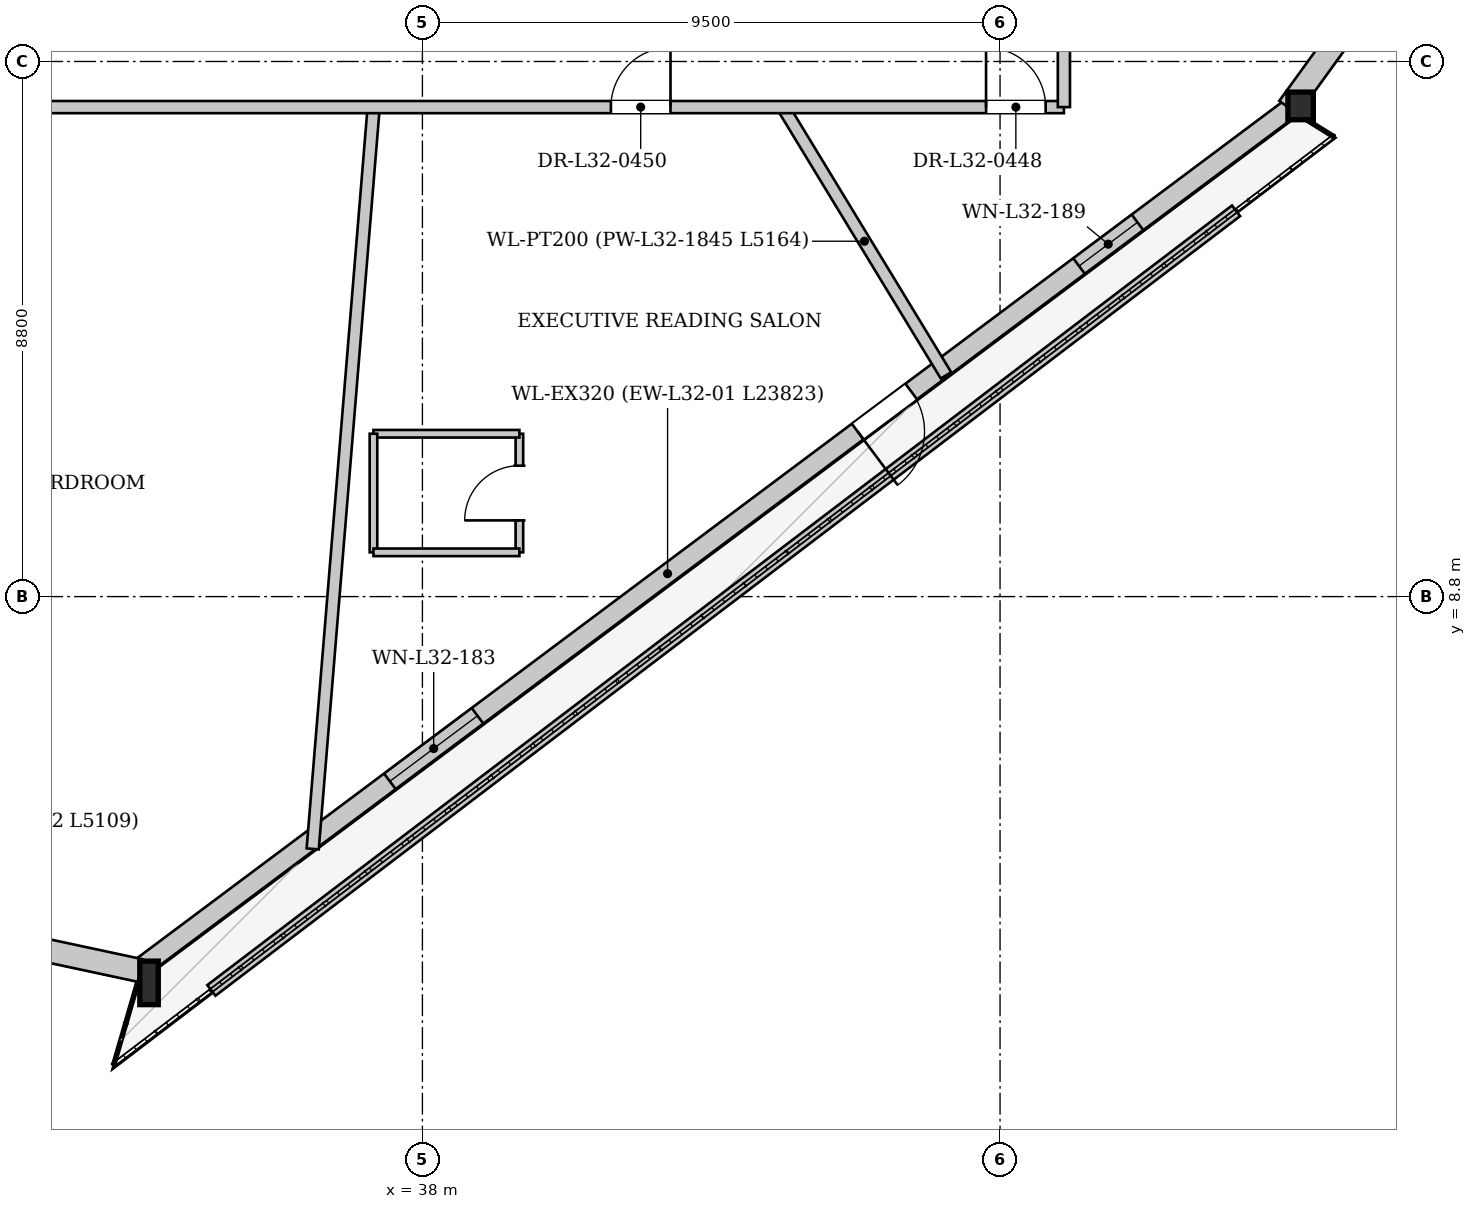
"""IFC4 building model, lengths in metres.
Left out: names, types, materials, properties, quantities, classifications, styles, units other than length and angle.
Written with IfcOpenShell. Run it as: python <this file> out.ifc"""

import sys

from ifc_helpers import new_model, si_unit, direction, frame, frame_2d, origin, origin_2d, place, context, subcontext, project, spatial, rectangle, i_section, extrude, source, transform, mapped, element, fill, save


model = new_model("IFC4")
c1 = context("Model", 3, precision=1e-05, world=origin(), true_north=direction((0.0, 1.0)))
c2 = subcontext(c1, "Body", "Model", "MODEL_VIEW")
j1 = project(units=[si_unit("LENGTHUNIT", "METRE"), si_unit("PLANEANGLEUNIT", "RADIAN")], contexts=[c1])
p1 = place(None, origin())
s1 = spatial("IfcSite", under=j1, at=p1, CompositionType="ELEMENT")
p2 = place(p1, origin())
s2 = spatial("IfcBuilding", under=s1, at=p2, CompositionType="ELEMENT")
p3 = place(p2, frame((0.0, 0.0, 123.45)))
s3 = spatial("IfcBuildingStorey", under=s2, at=p3, CompositionType="ELEMENT", Elevation=123.45)
m1 = source(origin(), c2, "Body", "SweptSolid", [
    extrude(i_section(OverallWidth=0.304, OverallDepth=0.716, WebThickness=0.021, FlangeThickness=0.04, at=origin_2d()), origin(), (0.0, 0.0, 1.0), 3.405),
])
p4 = place(p3, frame((33.321, 2.464, 0.0), z_axis=(0.107623996399, -0.009966512658, 0.994141712245), x_axis=(0.092210391017, 0.995739546161, 0.0)))
e1 = element("IfcColumn", 1, at=p4, inside=s3, PredefinedType="COLUMN", context=c2, shape_type="MappedRepresentation", body=[
    mapped(m1, transform((0.0, 0.0, 0.0), x_axis=(1.0, 0.0, 0.0), y_axis=(0.0, 1.0, 0.0), z_axis=(0.0, 0.0, 1.0), scale=1.0)),
])
m2 = source(origin(), c2, "Body", "SweptSolid", [
    extrude(i_section(OverallWidth=0.418, OverallDepth=0.455, WebThickness=0.038, FlangeThickness=0.059, at=origin_2d()), origin(), (0.0, 0.0, 1.0), 3.398),
])
p5 = place(p3, frame((52.4, 16.729, 0.0), z_axis=(0.025364652364, 0.082560865627, 0.996263187053), x_axis=(-0.955904837119, 0.293676594868, 0.0)))
e2 = element("IfcColumn", 2, at=p5, inside=s3, PredefinedType="COLUMN", context=c2, shape_type="MappedRepresentation", body=[
    mapped(m2, transform((0.0, 0.0, 0.0), x_axis=(1.0, 0.0, 0.0), y_axis=(0.0, 1.0, 0.0), z_axis=(0.0, 0.0, 1.0), scale=1.0)),
])
p6 = place(p3, frame((52.305, 16.857, 0.0), z_axis=(0.0, 0.0, 1.0), x_axis=(-0.800901761672, -0.598795764974, 0.0)))
e3 = element("IfcWall", 3, at=p6, inside=s3, PredefinedType="SOLIDWALL", context=c2, shape_type="SweptSolid", body=[
    extrude(rectangle(XDim=23.823, YDim=0.32, at=frame_2d((11.911, 0.0))), origin(), (0.0, 0.0, 1.0), 2.692),
])
p7 = place(p6, frame((7.823, 0.0, 0.0)))
e4 = element("IfcOpeningElement", 4, at=p7, cuts=e3, PredefinedType="OPENING", context=c2, shape_type="SweptSolid", body=[
    extrude(rectangle(XDim=1.1, YDim=2.3, at=frame_2d((0.55, 1.15))), frame((0.0, 0.17, 0.0), z_axis=(0.0, -1.0, 0.0), x_axis=(1.0, 0.0, 0.0)), (0.0, 0.0, 1.0), 0.34),
])
p8 = place(p6, frame((16.729, 0.0, 0.372)))
e5 = element("IfcOpeningElement", 5, at=p8, cuts=e3, PredefinedType="OPENING", context=c2, shape_type="SweptSolid", body=[
    extrude(rectangle(XDim=1.8, YDim=2.2, at=frame_2d((0.9, 1.1))), frame((0.0, 0.17, 0.0), z_axis=(0.0, -1.0, 0.0), x_axis=(1.0, 0.0, 0.0)), (0.0, 0.0, 1.0), 0.34),
])
p9 = place(p6, frame((3.177, 0.0, 0.65)))
e6 = element("IfcOpeningElement", 6, at=p9, cuts=e3, PredefinedType="OPENING", context=c2, shape_type="SweptSolid", body=[
    extrude(rectangle(XDim=1.2, YDim=1.5, at=frame_2d((0.6, 0.75))), frame((0.0, 0.17, 0.0), z_axis=(0.0, -1.0, 0.0), x_axis=(1.0, 0.0, 0.0)), (0.0, 0.0, 1.0), 0.34),
])
p10 = place(p3, frame((33.361, 2.65, 0.0), z_axis=(0.0, 0.0, 1.0), x_axis=(-0.977780031058, 0.209633515602, 0.0)))
e7 = element("IfcWall", 7, at=p10, inside=s3, PredefinedType="SOLIDWALL", context=c2, shape_type="SweptSolid", body=[
    extrude(rectangle(XDim=5.109, YDim=0.38, at=frame_2d((2.555, 0.0))), origin(), (0.0, 0.0, 1.0), 2.692),
])
p11 = place(p3, frame((66.21, 36.142, 0.0), z_axis=(0.0, 0.0, 1.0), x_axis=(-0.586152279149, -0.810200904497, 0.0)))
e8 = element("IfcWall", 8, at=p11, inside=s3, PredefinedType="SOLIDWALL", context=c2, shape_type="SweptSolid", body=[
    extrude(rectangle(XDim=23.823, YDim=0.38, at=frame_2d((11.911, 0.0))), origin(), (0.0, 0.0, 1.0), 2.692),
])
p12 = place(p11, frame((5.57, 0.0, 0.322)))
e9 = element("IfcOpeningElement", 9, at=p12, cuts=e8, PredefinedType="OPENING", context=c2, shape_type="SweptSolid", body=[
    extrude(rectangle(XDim=2.2, YDim=2.25, at=frame_2d((1.1, 1.125))), frame((0.0, 0.2, 0.0), z_axis=(0.0, -1.0, 0.0), x_axis=(1.0, 0.0, 0.0)), (0.0, 0.0, 1.0), 0.4),
])
p13 = place(p11, frame((14.452, 0.0, 0.322)))
e10 = element("IfcOpeningElement", 10, at=p13, cuts=e8, PredefinedType="OPENING", context=c2, shape_type="SweptSolid", body=[
    extrude(rectangle(XDim=2.2, YDim=2.25, at=frame_2d((1.1, 1.125))), frame((0.0, 0.2, 0.0), z_axis=(0.0, -1.0, 0.0), x_axis=(1.0, 0.0, 0.0)), (0.0, 0.0, 1.0), 0.4),
])
p14 = place(p3, frame((34.529, 2.323, 0.0), z_axis=(0.0, 0.0, 1.0), x_axis=(0.795860822031, 0.605479604905, 0.0)))
e11 = element("IfcWall", 11, at=p14, inside=s3, PredefinedType="PARAPET", context=c2, shape_type="SweptSolid", body=[
    extrude(rectangle(XDim=21.175, YDim=0.22, at=frame_2d((10.587, 0.0))), origin(), (0.0, 0.0, 1.0), 0.3),
])
p15 = place(p3, frame((43.928, 16.85, 0.0), z_axis=(0.0, 0.0, 1.0), x_axis=(0.519520898973, -0.85445774356, 0.0)))
e12 = element("IfcWall", 12, at=p15, inside=s3, PredefinedType="PARTITIONING", context=c2, shape_type="SweptSolid", body=[
    extrude(rectangle(XDim=5.164, YDim=0.2, at=frame_2d((2.582, 0.0))), origin(), (0.0, 0.0, 1.0), 3.3),
])
p16 = place(p3, frame((37.198, 16.85, 0.0), z_axis=(0.0, 0.0, 1.0), x_axis=(-0.08193618257, -0.996637578052, 0.0)))
e13 = element("IfcWall", 13, at=p16, inside=s3, PredefinedType="PARTITIONING", context=c2, shape_type="SweptSolid", body=[
    extrude(rectangle(XDim=12.24, YDim=0.2, at=frame_2d((6.12, 0.0))), origin(), (0.0, 0.0, 1.0), 3.3),
])
p17 = place(p3, frame((39.595, 9.528, 0.0), z_axis=(0.0, 0.0, 1.0), x_axis=(0.0, 1.0, 0.0)))
e14 = element("IfcWall", 14, at=p17, inside=s3, PredefinedType="PARTITIONING", context=c2, shape_type="SweptSolid", body=[
    extrude(rectangle(XDim=1.95, YDim=0.125, at=frame_2d((0.975, 0.0))), origin(), (0.0, 0.0, 1.0), 3.3),
])
p18 = place(p17, frame((0.525, 0.0, 0.0)))
e15 = element("IfcOpeningElement", 15, at=p18, cuts=e14, PredefinedType="OPENING", context=c2, shape_type="SweptSolid", body=[
    extrude(rectangle(XDim=0.9, YDim=2.1, at=frame_2d((0.45, 1.05))), frame((0.0, 0.073, 0.0), z_axis=(0.0, -1.0, 0.0), x_axis=(1.0, 0.0, 0.0)), (0.0, 0.0, 1.0), 0.145),
])
p19 = place(p3, frame((39.595, 11.478, 0.0), z_axis=(0.0, 0.0, 1.0), x_axis=(-1.0, 0.0, 0.0)))
e16 = element("IfcWall", 16, at=p19, inside=s3, PredefinedType="PARTITIONING", context=c2, shape_type="SweptSolid", body=[
    extrude(rectangle(XDim=2.4, YDim=0.125, at=frame_2d((1.2, 0.0))), origin(), (0.0, 0.0, 1.0), 2.985),
])
p20 = place(p3, frame((37.195, 11.478, 0.0), z_axis=(0.0, 0.0, 1.0), x_axis=(0.0, -1.0, 0.0)))
e17 = element("IfcWall", 17, at=p20, inside=s3, PredefinedType="PARTITIONING", context=c2, shape_type="SweptSolid", body=[
    extrude(rectangle(XDim=1.95, YDim=0.125, at=frame_2d((0.975, 0.0))), origin(), (0.0, 0.0, 1.0), 3.3),
])
p21 = place(p3, frame((37.195, 9.528, 0.0), z_axis=(0.0, 0.0, 1.0), x_axis=(1.0, 0.0, 0.0)))
e18 = element("IfcWall", 18, at=p21, inside=s3, PredefinedType="PARTITIONING", context=c2, shape_type="SweptSolid", body=[
    extrude(rectangle(XDim=2.4, YDim=0.125, at=frame_2d((1.2, 0.0))), origin(), (0.0, 0.0, 1.0), 3.3),
])
p22 = place(p3, frame((27.45, 16.85, 0.0), z_axis=(0.0, 0.0, 1.0), x_axis=(1.0, 0.0, 0.0)))
e19 = element("IfcWall", 19, at=p22, inside=s3, PredefinedType="PARTITIONING", context=c2, shape_type="SweptSolid", body=[
    extrude(rectangle(XDim=21.1, YDim=0.2, at=frame_2d((10.55, 0.0))), origin(), (0.0, 0.0, 1.0), 2.985),
])
p23 = place(p22, frame((19.82, 0.0, 0.0)))
e20 = element("IfcOpeningElement", 20, at=p23, cuts=e19, PredefinedType="OPENING", context=c2, shape_type="SweptSolid", body=[
    extrude(rectangle(XDim=0.98, YDim=2.15, at=frame_2d((0.49, 1.075))), frame((0.0, 0.11, 0.0), z_axis=(0.0, -1.0, 0.0), x_axis=(1.0, 0.0, 0.0)), (0.0, 0.0, 1.0), 0.22),
])
p24 = place(p22, frame((2.494, 0.0, 0.0)))
e21 = element("IfcOpeningElement", 21, at=p24, cuts=e19, PredefinedType="OPENING", context=c2, shape_type="SweptSolid", body=[
    extrude(rectangle(XDim=0.98, YDim=2.15, at=frame_2d((0.49, 1.075))), frame((0.0, 0.11, 0.0), z_axis=(0.0, -1.0, 0.0), x_axis=(1.0, 0.0, 0.0)), (0.0, 0.0, 1.0), 0.22),
])
p25 = place(p22, frame((13.65, 0.0, 0.0)))
e22 = element("IfcOpeningElement", 22, at=p25, cuts=e19, PredefinedType="OPENING", context=c2, shape_type="SweptSolid", body=[
    extrude(rectangle(XDim=0.98, YDim=2.15, at=frame_2d((0.49, 1.075))), frame((0.0, 0.11, 0.0), z_axis=(0.0, -1.0, 0.0), x_axis=(1.0, 0.0, 0.0)), (0.0, 0.0, 1.0), 0.22),
])
p26 = place(p3, frame((48.55, 16.85, 0.0), z_axis=(0.0, 0.0, 1.0), x_axis=(0.0, 1.0, 0.0)))
e23 = element("IfcWall", 23, at=p26, inside=s3, PredefinedType="PARTITIONING", context=c2, shape_type="SweptSolid", body=[
    extrude(rectangle(XDim=19.5, YDim=0.2, at=frame_2d((9.75, 0.0))), origin(), (0.0, 0.0, 1.0), 3.3),
])
p27 = place(p26, frame((10.851, 0.0, 0.0)))
e24 = element("IfcOpeningElement", 24, at=p27, cuts=e23, PredefinedType="OPENING", context=c2, shape_type="SweptSolid", body=[
    extrude(rectangle(XDim=0.98, YDim=2.15, at=frame_2d((0.49, 1.075))), frame((0.0, 0.11, 0.0), z_axis=(0.0, -1.0, 0.0), x_axis=(1.0, 0.0, 0.0)), (0.0, 0.0, 1.0), 0.22),
])
m3 = source(origin(), c2, "Body", "SweptSolid", [
    extrude(rectangle(XDim=1.1, YDim=2.3, at=frame_2d((0.55, 1.15))), frame((0.0, 0.025, 0.0), z_axis=(0.0, -1.0, 0.0), x_axis=(1.0, 0.0, 0.0)), (0.0, 0.0, 1.0), 0.05),
])
p28 = place(p7, origin())
e25 = element("IfcDoor", 25, at=p28, inside=s3, OperationType="SINGLE_SWING_RIGHT", PredefinedType="DOOR", context=c2, shape_type="MappedRepresentation", body=[
    mapped(m3, transform((0.0, 0.0, 0.0), x_axis=(1.0, 0.0, 0.0), y_axis=(0.0, 1.0, 0.0), z_axis=(0.0, 0.0, 1.0), scale=1.0)),
])
fill(e4, e25)
m4 = source(origin(), c2, "Body", "SweptSolid", [
    extrude(rectangle(XDim=1.8, YDim=2.2, at=frame_2d((0.9, 1.1))), frame((0.0, 0.03, 0.0), z_axis=(0.0, -1.0, 0.0), x_axis=(1.0, 0.0, 0.0)), (0.0, 0.0, 1.0), 0.06),
])
p29 = place(p8, origin())
e26 = element("IfcWindow", 26, at=p29, inside=s3, PartitioningType="SINGLE_PANEL", PredefinedType="WINDOW", context=c2, shape_type="MappedRepresentation", body=[
    mapped(m4, transform((0.0, 0.0, 0.0), x_axis=(1.0, 0.0, 0.0), y_axis=(0.0, 1.0, 0.0), z_axis=(0.0, 0.0, 1.0), scale=1.0)),
])
fill(e5, e26)
m5 = source(origin(), c2, "Body", "SweptSolid", [
    extrude(rectangle(XDim=1.2, YDim=1.5, at=frame_2d((0.6, 0.75))), frame((0.0, 0.03, 0.0), z_axis=(0.0, -1.0, 0.0), x_axis=(1.0, 0.0, 0.0)), (0.0, 0.0, 1.0), 0.06),
])
p30 = place(p9, origin())
e27 = element("IfcWindow", 27, at=p30, inside=s3, PartitioningType="SINGLE_PANEL", PredefinedType="WINDOW", context=c2, shape_type="MappedRepresentation", body=[
    mapped(m5, transform((0.0, 0.0, 0.0), x_axis=(1.0, 0.0, 0.0), y_axis=(0.0, 1.0, 0.0), z_axis=(0.0, 0.0, 1.0), scale=1.0)),
])
fill(e6, e27)
m6 = source(origin(), c2, "Body", "SweptSolid", [
    extrude(rectangle(XDim=0.9, YDim=2.1, at=frame_2d((0.45, 1.05))), frame((0.0, 0.025, 0.0), z_axis=(0.0, -1.0, 0.0), x_axis=(1.0, 0.0, 0.0)), (0.0, 0.0, 1.0), 0.05),
])
p31 = place(p18, origin())
e28 = element("IfcDoor", 28, at=p31, inside=s3, OperationType="SINGLE_SWING_LEFT", PredefinedType="DOOR", context=c2, shape_type="MappedRepresentation", body=[
    mapped(m6, transform((0.0, 0.0, 0.0), x_axis=(1.0, 0.0, 0.0), y_axis=(0.0, 1.0, 0.0), z_axis=(0.0, 0.0, 1.0), scale=1.0)),
])
fill(e15, e28)
m7 = source(origin(), c2, "Body", "SweptSolid", [
    extrude(rectangle(XDim=0.98, YDim=2.15, at=frame_2d((0.49, 1.075))), frame((0.0, 0.025, 0.0), z_axis=(0.0, -1.0, 0.0), x_axis=(1.0, 0.0, 0.0)), (0.0, 0.0, 1.0), 0.05),
])
p32 = place(p23, origin())
e29 = element("IfcDoor", 29, at=p32, inside=s3, OperationType="SINGLE_SWING_LEFT", PredefinedType="DOOR", context=c2, shape_type="MappedRepresentation", body=[
    mapped(m7, transform((0.0, 0.0, 0.0), x_axis=(1.0, 0.0, 0.0), y_axis=(0.0, 1.0, 0.0), z_axis=(0.0, 0.0, 1.0), scale=1.0)),
])
fill(e20, e29)
p33 = place(p25, origin())
e30 = element("IfcDoor", 30, at=p33, inside=s3, OperationType="SINGLE_SWING_RIGHT", PredefinedType="DOOR", context=c2, shape_type="MappedRepresentation", body=[
    mapped(m7, transform((0.0, 0.0, 0.0), x_axis=(1.0, 0.0, 0.0), y_axis=(0.0, 1.0, 0.0), z_axis=(0.0, 0.0, 1.0), scale=1.0)),
])
fill(e22, e30)
save(model, sys.argv[1])
